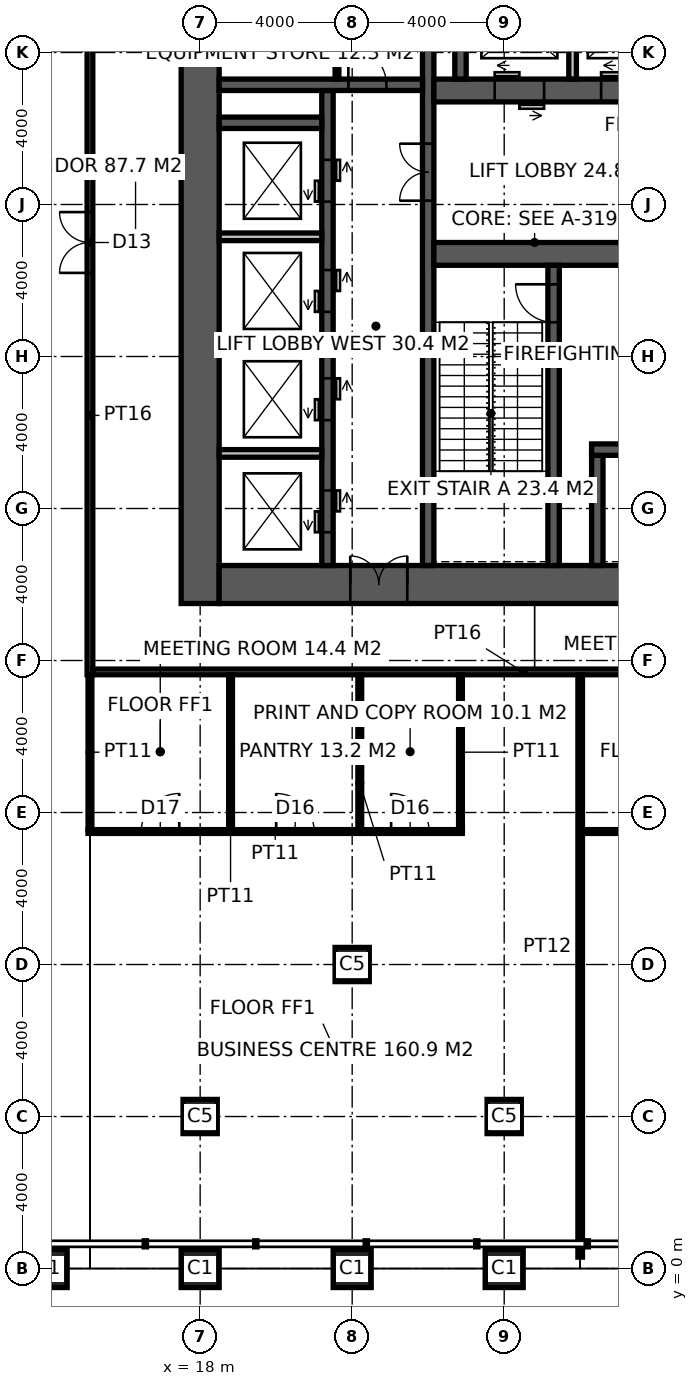
"""IFC4 building model, lengths in metres.
Left out: names, types, materials, properties, quantities, classifications, styles, units other than length and angle.
Written with IfcOpenShell. Run it as: python <this file> out.ifc"""

import sys

from ifc_helpers import new_model, si_unit, direction, frame, frame_2d, origin, origin_2d, place, context, subcontext, project, spatial, rectangle, hollow_rectangle, extrude, element, fill, save


model = new_model("IFC4")
c1 = context("Model", 3, precision=1e-05, world=origin(), true_north=direction((0.0, 1.0)))
c2 = subcontext(c1, "Body", "Model", "MODEL_VIEW")
j1 = project(units=[si_unit("LENGTHUNIT", "METRE"), si_unit("PLANEANGLEUNIT", "RADIAN")], contexts=[c1])
p1 = place(None, origin())
s1 = spatial("IfcSite", under=j1, at=p1, CompositionType="ELEMENT")
p2 = place(p1, origin())
s2 = spatial("IfcBuilding", under=s1, at=p2, CompositionType="ELEMENT")
p3 = place(p2, frame((0.0, 0.0, 76.4)))
s3 = spatial("IfcBuildingStorey", under=s2, at=p3, CompositionType="ELEMENT", Elevation=76.4)
for number, where, z_axis, x_axis in (
    (1, (14.0, 0.0, 0.0), (0.0, 0.0, 1.0), (1.0, 0.0, 0.0)),
    (2, (18.0, 0.0, 0.0), (0.0, 0.0, 1.0), (1.0, 0.0, 0.0)),
    (3, (22.0, 0.0, 0.0), (0.0, 0.0, 1.0), (1.0, 0.0, 0.0)),
    (4, (26.0, 0.0, 0.0), (0.0, 0.0, 1.0), (1.0, 0.0, 0.0)),
):
    element("IfcColumn", number, at=place(p3, frame(where, z_axis=z_axis, x_axis=x_axis)), inside=s3, PredefinedType="COLUMN", context=c2, shape_type="SweptSolid", body=[
        extrude(hollow_rectangle(XDim=1.0, YDim=1.0, WallThickness=0.1, at=origin_2d()), origin(), (0.0, 0.0, 1.0), 5.0),
    ])
for number, where, z_axis, x_axis in (
    (5, (18.0, 4.0, 0.0), (0.0, 0.0, 1.0), (1.0, 0.0, 0.0)),
    (6, (22.0, 8.0, 0.0), (0.0, 0.0, 1.0), (1.0, 0.0, 0.0)),
    (7, (26.0, 4.0, 0.0), (0.0, 0.0, 1.0), (1.0, 0.0, 0.0)),
):
    element("IfcColumn", number, at=place(p3, frame(where, z_axis=z_axis, x_axis=x_axis)), inside=s3, PredefinedType="COLUMN", context=c2, shape_type="SweptSolid", body=[
        extrude(hollow_rectangle(XDim=0.9, YDim=0.9, WallThickness=0.1, at=origin_2d()), origin(), (0.0, 0.0, 1.0), 5.0),
    ])
p4 = place(p3, frame((18.0, 17.5, -0.15), z_axis=(0.0, 0.0, 1.0), x_axis=(0.0, 1.0, 0.0)))
e8 = element("IfcWall", 8, at=p4, inside=s3, PredefinedType="SHEAR", context=c2, shape_type="SweptSolid", body=[
    extrude(rectangle(XDim=19.0, YDim=1.0, at=frame_2d((9.5, 0.0))), origin(), (0.0, 0.0, 1.0), 5.0),
])
p5 = place(p3, frame((18.5, 18.0, -0.15), z_axis=(0.0, 0.0, 1.0), x_axis=(1.0, 0.0, 0.0)))
e9 = element("IfcWall", 9, at=p5, inside=s3, PredefinedType="SHEAR", context=c2, shape_type="SweptSolid", body=[
    extrude(rectangle(XDim=17.6, YDim=1.0, at=frame_2d((8.8, 0.0))), origin(), (0.0, 0.0, 1.0), 5.0),
])
p6 = place(p5, frame((3.45, 0.0, 0.15)))
e10 = element("IfcOpeningElement", 10, at=p6, cuts=e9, PredefinedType="OPENING", context=c2, shape_type="SweptSolid", body=[
    extrude(rectangle(XDim=1.5, YDim=2.4, at=frame_2d((0.75, 1.2))), frame((0.0, 0.51, 0.0), z_axis=(0.0, -1.0, 0.0), x_axis=(1.0, 0.0, 0.0)), (0.0, 0.0, 1.0), 1.02),
])
p7 = place(p3, frame((24.0, 18.5, -0.15), z_axis=(0.0, 0.0, 1.0), x_axis=(0.0, 1.0, 0.0)))
e11 = element("IfcWall", 11, at=p7, inside=s3, PredefinedType="SHEAR", context=c2, shape_type="SweptSolid", body=[
    extrude(rectangle(XDim=17.0, YDim=0.3, at=frame_2d((8.5, 0.0))), origin(), (0.0, 0.0, 1.0), 5.0),
])
p8 = place(p7, frame((9.6, 0.0, 0.15)))
e12 = element("IfcOpeningElement", 12, at=p8, cuts=e11, PredefinedType="OPENING", context=c2, shape_type="SweptSolid", body=[
    extrude(rectangle(XDim=1.5, YDim=2.4, at=frame_2d((0.75, 1.2))), frame((0.0, 0.16, 0.0), z_axis=(0.0, -1.0, 0.0), x_axis=(1.0, 0.0, 0.0)), (0.0, 0.0, 1.0), 0.32),
])
p9 = place(p3, frame((24.15, 26.7, -0.15), z_axis=(0.0, 0.0, 1.0), x_axis=(1.0, 0.0, 0.0)))
e13 = element("IfcWall", 13, at=p9, inside=s3, PredefinedType="SHEAR", context=c2, shape_type="SweptSolid", body=[
    extrude(rectangle(XDim=11.25, YDim=0.6, at=frame_2d((5.625, 0.0))), origin(), (0.0, 0.0, 1.0), 5.0),
])
p10 = place(p9, frame((9.25, 0.0, 0.15)))
e14 = element("IfcOpeningElement", 14, at=p10, cuts=e13, PredefinedType="OPENING", context=c2, shape_type="SweptSolid", body=[
    extrude(rectangle(XDim=1.0, YDim=2.2, at=frame_2d((0.5, 1.1))), frame((0.0, 0.31, 0.0), z_axis=(0.0, -1.0, 0.0), x_axis=(1.0, 0.0, 0.0)), (0.0, 0.0, 1.0), 0.62),
])
p11 = place(p9, frame((4.9, 0.0, 0.15)))
e15 = element("IfcOpeningElement", 15, at=p11, cuts=e13, PredefinedType="OPENING", context=c2, shape_type="SweptSolid", body=[
    extrude(rectangle(XDim=1.5, YDim=2.4, at=frame_2d((0.75, 1.2))), frame((0.0, 0.31, 0.0), z_axis=(0.0, -1.0, 0.0), x_axis=(1.0, 0.0, 0.0)), (0.0, 0.0, 1.0), 0.62),
])
p12 = place(p3, frame((27.3, 18.5, -0.15), z_axis=(0.0, 0.0, 1.0), x_axis=(0.0, 1.0, 0.0)))
e16 = element("IfcWall", 16, at=p12, inside=s3, PredefinedType="SHEAR", context=c2, shape_type="SweptSolid", body=[
    extrude(rectangle(XDim=7.9, YDim=0.3, at=frame_2d((3.95, 0.0))), origin(), (0.0, 0.0, 1.0), 5.0),
])
p13 = place(p12, frame((6.4, 0.0, 0.15)))
e17 = element("IfcOpeningElement", 17, at=p13, cuts=e16, PredefinedType="OPENING", context=c2, shape_type="SweptSolid", body=[
    extrude(rectangle(XDim=1.0, YDim=2.2, at=frame_2d((0.5, 1.1))), frame((0.0, 0.16, 0.0), z_axis=(0.0, -1.0, 0.0), x_axis=(1.0, 0.0, 0.0)), (0.0, 0.0, 1.0), 0.32),
])
p14 = place(p3, frame((28.45, 18.5, -0.15), z_axis=(0.0, 0.0, 1.0), x_axis=(0.0, 1.0, 0.0)))
e18 = element("IfcWall", 18, at=p14, inside=s3, PredefinedType="SHEAR", context=c2, shape_type="SweptSolid", body=[
    extrude(rectangle(XDim=2.9, YDim=0.3, at=frame_2d((1.45, 0.0))), origin(), (0.0, 0.0, 1.0), 5.0),
])
p15 = place(p3, frame((28.3, 21.55, -0.15), z_axis=(0.0, 0.0, 1.0), x_axis=(1.0, 0.0, 0.0)))
e19 = element("IfcWall", 19, at=p15, inside=s3, PredefinedType="SHEAR", context=c2, shape_type="SweptSolid", body=[
    extrude(rectangle(XDim=3.8, YDim=0.3, at=frame_2d((1.9, 0.0))), origin(), (0.0, 0.0, 1.0), 5.0),
])
p16 = place(p15, frame((1.05, 0.0, 0.15)))
e20 = element("IfcOpeningElement", 20, at=p16, cuts=e19, PredefinedType="OPENING", context=c2, shape_type="SweptSolid", body=[
    extrude(rectangle(XDim=1.3, YDim=2.4, at=frame_2d((0.65, 1.2))), frame((0.0, 0.16, 0.0), z_axis=(0.0, -1.0, 0.0), x_axis=(1.0, 0.0, 0.0)), (0.0, 0.0, 1.0), 0.32),
])
p17 = place(p3, frame((24.15, 31.0, -0.15), z_axis=(0.0, 0.0, 1.0), x_axis=(1.0, 0.0, 0.0)))
e21 = element("IfcWall", 21, at=p17, inside=s3, PredefinedType="SHEAR", context=c2, shape_type="SweptSolid", body=[
    extrude(rectangle(XDim=11.25, YDim=0.6, at=frame_2d((5.625, 0.0))), origin(), (0.0, 0.0, 1.0), 5.0),
])
p18 = place(p17, frame((1.6, 0.0, 0.15)))
e22 = element("IfcOpeningElement", 22, at=p18, cuts=e21, PredefinedType="OPENING", context=c2, shape_type="SweptSolid", body=[
    extrude(rectangle(XDim=1.3, YDim=2.4, at=frame_2d((0.65, 1.2))), frame((0.0, 0.31, 0.0), z_axis=(0.0, -1.0, 0.0), x_axis=(1.0, 0.0, 0.0)), (0.0, 0.0, 1.0), 0.62),
])
p19 = place(p17, frame((4.4, 0.0, 0.15)))
e23 = element("IfcOpeningElement", 23, at=p19, cuts=e21, PredefinedType="OPENING", context=c2, shape_type="SweptSolid", body=[
    extrude(rectangle(XDim=1.3, YDim=2.4, at=frame_2d((0.65, 1.2))), frame((0.0, 0.31, 0.0), z_axis=(0.0, -1.0, 0.0), x_axis=(1.0, 0.0, 0.0)), (0.0, 0.0, 1.0), 0.62),
])
p20 = place(p17, frame((7.25, 0.0, 0.15)))
e24 = element("IfcOpeningElement", 24, at=p20, cuts=e21, PredefinedType="OPENING", context=c2, shape_type="SweptSolid", body=[
    extrude(rectangle(XDim=1.4, YDim=2.4, at=frame_2d((0.7, 1.2))), frame((0.0, 0.31, 0.0), z_axis=(0.0, -1.0, 0.0), x_axis=(1.0, 0.0, 0.0)), (0.0, 0.0, 1.0), 0.62),
])
p21 = place(p3, frame((21.35, 18.5, -0.15), z_axis=(0.0, 0.0, 1.0), x_axis=(0.0, 1.0, 0.0)))
e25 = element("IfcWall", 25, at=p21, inside=s3, PredefinedType="SHEAR", context=c2, shape_type="SweptSolid", body=[
    extrude(rectangle(XDim=12.5, YDim=0.3, at=frame_2d((6.25, 0.0))), origin(), (0.0, 0.0, 1.0), 5.0),
])
p22 = place(p21, frame((0.875, 0.0, 0.15)))
e26 = element("IfcOpeningElement", 26, at=p22, cuts=e25, PredefinedType="OPENING", context=c2, shape_type="SweptSolid", body=[
    extrude(rectangle(XDim=1.1, YDim=2.2, at=frame_2d((0.55, 1.1))), frame((0.0, 0.16, 0.0), z_axis=(0.0, -1.0, 0.0), x_axis=(1.0, 0.0, 0.0)), (0.0, 0.0, 1.0), 0.32),
])
p23 = place(p21, frame((3.825, 0.0, 0.15)))
e27 = element("IfcOpeningElement", 27, at=p23, cuts=e25, PredefinedType="OPENING", context=c2, shape_type="SweptSolid", body=[
    extrude(rectangle(XDim=1.1, YDim=2.2, at=frame_2d((0.55, 1.1))), frame((0.0, 0.16, 0.0), z_axis=(0.0, -1.0, 0.0), x_axis=(1.0, 0.0, 0.0)), (0.0, 0.0, 1.0), 0.32),
])
p24 = place(p21, frame((6.675, 0.0, 0.15)))
e28 = element("IfcOpeningElement", 28, at=p24, cuts=e25, PredefinedType="OPENING", context=c2, shape_type="SweptSolid", body=[
    extrude(rectangle(XDim=1.1, YDim=2.2, at=frame_2d((0.55, 1.1))), frame((0.0, 0.16, 0.0), z_axis=(0.0, -1.0, 0.0), x_axis=(1.0, 0.0, 0.0)), (0.0, 0.0, 1.0), 0.32),
])
p25 = place(p21, frame((9.575, 0.0, 0.15)))
e29 = element("IfcOpeningElement", 29, at=p25, cuts=e25, PredefinedType="OPENING", context=c2, shape_type="SweptSolid", body=[
    extrude(rectangle(XDim=1.1, YDim=2.2, at=frame_2d((0.55, 1.1))), frame((0.0, 0.16, 0.0), z_axis=(0.0, -1.0, 0.0), x_axis=(1.0, 0.0, 0.0)), (0.0, 0.0, 1.0), 0.32),
])
p26 = place(p3, frame((18.5, 31.15, -0.15), z_axis=(0.0, 0.0, 1.0), x_axis=(1.0, 0.0, 0.0)))
e30 = element("IfcWall", 30, at=p26, inside=s3, PredefinedType="SHEAR", context=c2, shape_type="SweptSolid", body=[
    extrude(rectangle(XDim=5.35, YDim=0.3, at=frame_2d((2.675, 0.0))), origin(), (0.0, 0.0, 1.0), 5.0),
])
p27 = place(p26, frame((3.4, 0.0, 0.15)))
e31 = element("IfcOpeningElement", 31, at=p27, cuts=e30, PredefinedType="OPENING", context=c2, shape_type="SweptSolid", body=[
    extrude(rectangle(XDim=1.0, YDim=2.2, at=frame_2d((0.5, 1.1))), frame((0.0, 0.16, 0.0), z_axis=(0.0, -1.0, 0.0), x_axis=(1.0, 0.0, 0.0)), (0.0, 0.0, 1.0), 0.32),
])
p28 = place(p3, frame((18.5, 30.15, -0.15), z_axis=(0.0, 0.0, 1.0), x_axis=(1.0, 0.0, 0.0)))
e32 = element("IfcWall", 32, at=p28, inside=s3, PredefinedType="SHEAR", context=c2, shape_type="SweptSolid", body=[
    extrude(rectangle(XDim=2.7, YDim=0.3, at=frame_2d((1.35, 0.0))), origin(), (0.0, 0.0, 1.0), 5.0),
])
p29 = place(p3, frame((24.85, 31.3, -0.15), z_axis=(0.0, 0.0, 1.0), x_axis=(0.0, 1.0, 0.0)))
e33 = element("IfcWall", 33, at=p29, inside=s3, PredefinedType="SHEAR", context=c2, shape_type="SweptSolid", body=[
    extrude(rectangle(XDim=4.2, YDim=0.3, at=frame_2d((2.1, 0.0))), origin(), (0.0, 0.0, 1.0), 5.0),
])
p30 = place(p3, frame((27.8, 31.3, -0.15), z_axis=(0.0, 0.0, 1.0), x_axis=(0.0, 1.0, 0.0)))
e34 = element("IfcWall", 34, at=p30, inside=s3, PredefinedType="SOLIDWALL", context=c2, shape_type="SweptSolid", body=[
    extrude(rectangle(XDim=2.8, YDim=0.2, at=frame_2d((1.4, 0.0))), origin(), (0.0, 0.0, 1.0), 5.0),
])
for number, where, z_axis, x_axis in (
    (35, (18.5, 21.45, -0.15), (0.0, 0.0, 1.0), (1.0, 0.0, 0.0)),
    (36, (18.5, 24.3, -0.15), (0.0, 0.0, 1.0), (1.0, 0.0, 0.0)),
    (37, (18.5, 27.15, -0.15), (0.0, 0.0, 1.0), (1.0, 0.0, 0.0)),
):
    element("IfcWall", number, at=place(p3, frame(where, z_axis=z_axis, x_axis=x_axis)), inside=s3, PredefinedType="SOLIDWALL", context=c2, shape_type="SweptSolid", body=[
        extrude(rectangle(XDim=2.7, YDim=0.2, at=frame_2d((1.35, 0.0))), origin(), (0.0, 0.0, 1.0), 5.0),
    ])
p31 = place(p3, frame((21.6, 31.3, 0.0), z_axis=(0.0, 0.0, 1.0), x_axis=(0.0, 1.0, 0.0)))
e38 = element("IfcWall", 38, at=p31, inside=s3, PredefinedType="PARTITIONING", context=c2, shape_type="SweptSolid", body=[
    extrude(rectangle(XDim=4.2, YDim=0.1, at=frame_2d((2.1, 0.0))), origin(), (0.0, 0.0, 1.0), 4.85),
])
p32 = place(p31, frame((1.55, 0.0, 0.0)))
e39 = element("IfcOpeningElement", 39, at=p32, cuts=e38, PredefinedType="OPENING", context=c2, shape_type="SweptSolid", body=[
    extrude(rectangle(XDim=1.0, YDim=2.2, at=frame_2d((0.5, 1.1))), frame((0.0, 0.06, 0.0), z_axis=(0.0, -1.0, 0.0), x_axis=(1.0, 0.0, 0.0)), (0.0, 0.0, 1.0), 0.12),
])
p33 = place(p3, frame((15.1, 15.625, 0.0), z_axis=(0.0, 0.0, 1.0), x_axis=(0.0, 1.0, 0.0)))
e40 = element("IfcWall", 40, at=p33, inside=s3, PredefinedType="PARTITIONING", context=c2, shape_type="SweptSolid", body=[
    extrude(rectangle(XDim=22.75, YDim=0.15, at=frame_2d((11.375, 0.0))), origin(), (0.0, 0.0, 1.0), 4.85),
])
p34 = place(p33, frame((10.575, 0.0, 0.0)))
e41 = element("IfcOpeningElement", 41, at=p34, cuts=e40, PredefinedType="OPENING", context=c2, shape_type="SweptSolid", body=[
    extrude(rectangle(XDim=1.6, YDim=2.7, at=frame_2d((0.8, 1.35))), frame((0.0, 0.085, 0.0), z_axis=(0.0, -1.0, 0.0), x_axis=(1.0, 0.0, 0.0)), (0.0, 0.0, 1.0), 0.17),
])
p35 = place(p3, frame((15.175, 15.7, 0.0), z_axis=(0.0, 0.0, 1.0), x_axis=(1.0, 0.0, 0.0)))
e42 = element("IfcWall", 42, at=p35, inside=s3, PredefinedType="PARTITIONING", context=c2, shape_type="SweptSolid", body=[
    extrude(rectangle(XDim=22.65, YDim=0.15, at=frame_2d((11.325, 0.0))), origin(), (0.0, 0.0, 1.0), 4.85),
])
p36 = place(p3, frame((28.0, 0.3, 0.0), z_axis=(0.0, 0.0, 1.0), x_axis=(0.0, 1.0, 0.0)))
e43 = element("IfcWall", 43, at=p36, inside=s3, PredefinedType="PARTITIONING", context=c2, shape_type="SweptSolid", body=[
    extrude(rectangle(XDim=15.325, YDim=0.12, at=frame_2d((7.663, 0.0))), origin(), (0.0, 0.0, 1.0), 4.85),
])
p37 = place(p3, frame((15.05, 11.5, 0.0), z_axis=(0.0, 0.0, 1.0), x_axis=(1.0, 0.0, 0.0)))
e44 = element("IfcWall", 44, at=p37, inside=s3, PredefinedType="PARTITIONING", context=c2, shape_type="SweptSolid", body=[
    extrude(rectangle(XDim=9.85, YDim=0.1, at=frame_2d((4.925, 0.0))), origin(), (0.0, 0.0, 1.0), 4.85),
])
p38 = place(p37, frame((1.4, 0.0, 0.0)))
e45 = element("IfcOpeningElement", 45, at=p38, cuts=e44, PredefinedType="OPENING", context=c2, shape_type="SweptSolid", body=[
    extrude(rectangle(XDim=1.0, YDim=2.2, at=frame_2d((0.5, 1.1))), frame((0.0, 0.06, 0.0), z_axis=(0.0, -1.0, 0.0), x_axis=(1.0, 0.0, 0.0)), (0.0, 0.0, 1.0), 0.12),
])
p39 = place(p37, frame((4.95, 0.0, 0.0)))
e46 = element("IfcOpeningElement", 46, at=p39, cuts=e44, PredefinedType="OPENING", context=c2, shape_type="SweptSolid", body=[
    extrude(rectangle(XDim=1.0, YDim=2.2, at=frame_2d((0.5, 1.1))), frame((0.0, 0.06, 0.0), z_axis=(0.0, -1.0, 0.0), x_axis=(1.0, 0.0, 0.0)), (0.0, 0.0, 1.0), 0.12),
])
p40 = place(p37, frame((7.975, 0.0, 0.0)))
e47 = element("IfcOpeningElement", 47, at=p40, cuts=e44, PredefinedType="OPENING", context=c2, shape_type="SweptSolid", body=[
    extrude(rectangle(XDim=1.0, YDim=2.2, at=frame_2d((0.5, 1.1))), frame((0.0, 0.06, 0.0), z_axis=(0.0, -1.0, 0.0), x_axis=(1.0, 0.0, 0.0)), (0.0, 0.0, 1.0), 0.12),
])
p41 = place(p3, frame((28.061, 11.5, 0.0), z_axis=(0.0, 0.0, 1.0), x_axis=(1.0, 0.0, 0.0)))
e48 = element("IfcWall", 48, at=p41, inside=s3, PredefinedType="PARTITIONING", context=c2, shape_type="SweptSolid", body=[
    extrude(rectangle(XDim=9.889, YDim=0.1, at=frame_2d((4.944, 0.0))), origin(), (0.0, 0.0, 1.0), 4.85),
])
p42 = place(p41, frame((2.14, 0.0, 0.0)))
e49 = element("IfcOpeningElement", 49, at=p42, cuts=e48, PredefinedType="OPENING", context=c2, shape_type="SweptSolid", body=[
    extrude(rectangle(XDim=1.0, YDim=2.2, at=frame_2d((0.5, 1.1))), frame((0.0, 0.06, 0.0), z_axis=(0.0, -1.0, 0.0), x_axis=(1.0, 0.0, 0.0)), (0.0, 0.0, 1.0), 0.12),
])
p43 = place(p41, frame((7.09, 0.0, 0.0)))
e50 = element("IfcOpeningElement", 50, at=p43, cuts=e48, PredefinedType="OPENING", context=c2, shape_type="SweptSolid", body=[
    extrude(rectangle(XDim=1.0, YDim=2.2, at=frame_2d((0.5, 1.1))), frame((0.0, 0.06, 0.0), z_axis=(0.0, -1.0, 0.0), x_axis=(1.0, 0.0, 0.0)), (0.0, 0.0, 1.0), 0.12),
])
for number, where, z_axis, x_axis in (
    (51, (15.1, 11.55, 0.0), (0.0, 0.0, 1.0), (0.0, 1.0, 0.0)),
    (52, (18.8, 11.55, 0.0), (0.0, 0.0, 1.0), (0.0, 1.0, 0.0)),
    (53, (22.2, 11.55, 0.0), (0.0, 0.0, 1.0), (0.0, 1.0, 0.0)),
    (54, (24.85, 11.55, 0.0), (0.0, 0.0, 1.0), (0.0, 1.0, 0.0)),
):
    element("IfcWall", number, at=place(p3, frame(where, z_axis=z_axis, x_axis=x_axis)), inside=s3, PredefinedType="PARTITIONING", context=c2, shape_type="SweptSolid", body=[
        extrude(rectangle(XDim=4.075, YDim=0.1, at=frame_2d((2.038, 0.0))), origin(), (0.0, 0.0, 1.0), 4.85),
    ])
p44 = place(p13, origin())
e55 = element("IfcDoor", 55, at=p44, inside=s3, OperationType="SINGLE_SWING_RIGHT", PredefinedType="DOOR", context=c2, shape_type="SweptSolid", body=[
    extrude(rectangle(XDim=1.0, YDim=2.2, at=frame_2d((0.5, 1.1))), frame((0.0, 0.025, 0.0), z_axis=(0.0, -1.0, 0.0), x_axis=(1.0, 0.0, 0.0)), (0.0, 0.0, 1.0), 0.05),
])
fill(e17, e55)
p45 = place(p8, origin())
e56 = element("IfcDoor", 56, at=p45, inside=s3, OperationType="DOUBLE_DOOR_DOUBLE_SWING", PredefinedType="DOOR", context=c2, shape_type="SweptSolid", body=[
    extrude(rectangle(XDim=1.5, YDim=2.4, at=frame_2d((0.75, 1.2))), frame((0.0, 0.025, 0.0), z_axis=(0.0, -1.0, 0.0), x_axis=(1.0, 0.0, 0.0)), (0.0, 0.0, 1.0), 0.05),
])
fill(e12, e56)
p46 = place(p27, origin())
e57 = element("IfcDoor", 57, at=p46, inside=s3, OperationType="SINGLE_SWING_LEFT", PredefinedType="DOOR", context=c2, shape_type="SweptSolid", body=[
    extrude(rectangle(XDim=1.0, YDim=2.2, at=frame_2d((0.5, 1.1))), frame((0.0, 0.025, 0.0), z_axis=(0.0, -1.0, 0.0), x_axis=(1.0, 0.0, 0.0)), (0.0, 0.0, 1.0), 0.05),
])
fill(e31, e57)
p47 = place(p6, origin())
e58 = element("IfcDoor", 58, at=p47, inside=s3, OperationType="DOUBLE_DOOR_DOUBLE_SWING", PredefinedType="DOOR", context=c2, shape_type="SweptSolid", body=[
    extrude(rectangle(XDim=1.5, YDim=2.4, at=frame_2d((0.75, 1.2))), frame((0.0, 0.025, 0.0), z_axis=(0.0, -1.0, 0.0), x_axis=(1.0, 0.0, 0.0)), (0.0, 0.0, 1.0), 0.05),
])
fill(e10, e58)
p48 = place(p34, origin())
e59 = element("IfcDoor", 59, at=p48, inside=s3, OperationType="DOUBLE_DOOR_DOUBLE_SWING", PredefinedType="DOOR", context=c2, shape_type="SweptSolid", body=[
    extrude(rectangle(XDim=1.6, YDim=2.7, at=frame_2d((0.8, 1.35))), frame((0.0, 0.025, 0.0), z_axis=(0.0, -1.0, 0.0), x_axis=(1.0, 0.0, 0.0)), (0.0, 0.0, 1.0), 0.05),
])
fill(e41, e59)
p49 = place(p38, origin())
e60 = element("IfcDoor", 60, at=p49, inside=s3, OperationType="SINGLE_SWING_RIGHT", PredefinedType="DOOR", context=c2, shape_type="SweptSolid", body=[
    extrude(rectangle(XDim=1.0, YDim=2.2, at=frame_2d((0.5, 1.1))), frame((0.0, 0.025, 0.0), z_axis=(0.0, -1.0, 0.0), x_axis=(1.0, 0.0, 0.0)), (0.0, 0.0, 1.0), 0.05),
])
fill(e45, e60)
p50 = place(p39, origin())
e61 = element("IfcDoor", 61, at=p50, inside=s3, OperationType="SINGLE_SWING_LEFT", PredefinedType="DOOR", context=c2, shape_type="SweptSolid", body=[
    extrude(rectangle(XDim=1.0, YDim=2.2, at=frame_2d((0.5, 1.1))), frame((0.0, 0.025, 0.0), z_axis=(0.0, -1.0, 0.0), x_axis=(1.0, 0.0, 0.0)), (0.0, 0.0, 1.0), 0.05),
])
fill(e46, e61)
p51 = place(p40, origin())
e62 = element("IfcDoor", 62, at=p51, inside=s3, OperationType="SINGLE_SWING_LEFT", PredefinedType="DOOR", context=c2, shape_type="SweptSolid", body=[
    extrude(rectangle(XDim=1.0, YDim=2.2, at=frame_2d((0.5, 1.1))), frame((0.0, 0.025, 0.0), z_axis=(0.0, -1.0, 0.0), x_axis=(1.0, 0.0, 0.0)), (0.0, 0.0, 1.0), 0.05),
])
fill(e47, e62)
p52 = place(p18, origin())
e63 = element("IfcDoor", 63, at=p52, inside=s3, OperationType="DOUBLE_DOOR_SLIDING", PredefinedType="DOOR", context=c2, shape_type="SweptSolid", body=[
    extrude(rectangle(XDim=1.3, YDim=2.4, at=frame_2d((0.65, 1.2))), frame((0.0, 0.025, 0.0), z_axis=(0.0, -1.0, 0.0), x_axis=(1.0, 0.0, 0.0)), (0.0, 0.0, 1.0), 0.05),
])
fill(e22, e63)
p53 = place(p19, origin())
e64 = element("IfcDoor", 64, at=p53, inside=s3, OperationType="DOUBLE_DOOR_SLIDING", PredefinedType="DOOR", context=c2, shape_type="SweptSolid", body=[
    extrude(rectangle(XDim=1.3, YDim=2.4, at=frame_2d((0.65, 1.2))), frame((0.0, 0.025, 0.0), z_axis=(0.0, -1.0, 0.0), x_axis=(1.0, 0.0, 0.0)), (0.0, 0.0, 1.0), 0.05),
])
fill(e23, e64)
p54 = place(p22, origin())
e65 = element("IfcDoor", 65, at=p54, inside=s3, OperationType="DOUBLE_DOOR_SLIDING", PredefinedType="DOOR", context=c2, shape_type="SweptSolid", body=[
    extrude(rectangle(XDim=1.1, YDim=2.2, at=frame_2d((0.55, 1.1))), frame((0.0, 0.025, 0.0), z_axis=(0.0, -1.0, 0.0), x_axis=(1.0, 0.0, 0.0)), (0.0, 0.0, 1.0), 0.05),
])
fill(e26, e65)
p55 = place(p23, origin())
e66 = element("IfcDoor", 66, at=p55, inside=s3, OperationType="DOUBLE_DOOR_SLIDING", PredefinedType="DOOR", context=c2, shape_type="SweptSolid", body=[
    extrude(rectangle(XDim=1.1, YDim=2.2, at=frame_2d((0.55, 1.1))), frame((0.0, 0.025, 0.0), z_axis=(0.0, -1.0, 0.0), x_axis=(1.0, 0.0, 0.0)), (0.0, 0.0, 1.0), 0.05),
])
fill(e27, e66)
p56 = place(p24, origin())
e67 = element("IfcDoor", 67, at=p56, inside=s3, OperationType="DOUBLE_DOOR_SLIDING", PredefinedType="DOOR", context=c2, shape_type="SweptSolid", body=[
    extrude(rectangle(XDim=1.1, YDim=2.2, at=frame_2d((0.55, 1.1))), frame((0.0, 0.025, 0.0), z_axis=(0.0, -1.0, 0.0), x_axis=(1.0, 0.0, 0.0)), (0.0, 0.0, 1.0), 0.05),
])
fill(e28, e67)
p57 = place(p25, origin())
e68 = element("IfcDoor", 68, at=p57, inside=s3, OperationType="DOUBLE_DOOR_SLIDING", PredefinedType="DOOR", context=c2, shape_type="SweptSolid", body=[
    extrude(rectangle(XDim=1.1, YDim=2.2, at=frame_2d((0.55, 1.1))), frame((0.0, 0.025, 0.0), z_axis=(0.0, -1.0, 0.0), x_axis=(1.0, 0.0, 0.0)), (0.0, 0.0, 1.0), 0.05),
])
fill(e29, e68)
save(model, sys.argv[1])
